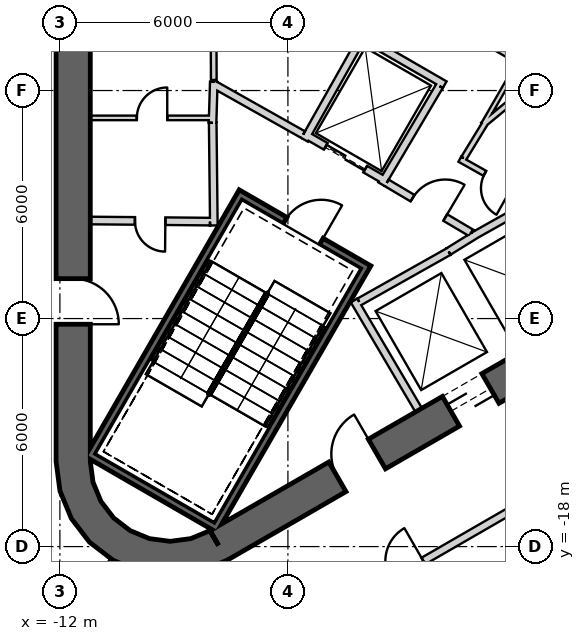
"""IFC4 building model, lengths in metres.
Left out: names, types, materials, properties, quantities, classifications, styles, units other than length and angle.
Written with IfcOpenShell. Run it as: python <this file> out.ifc"""

import sys

from ifc_helpers import new_model, si_unit, direction, frame, frame_2d, origin, place, context, subcontext, project, spatial, polyline, rectangle, outline, extrude, element, fill, save


model = new_model("IFC4")
c1 = context("Model", 3, precision=1e-05, world=origin(), true_north=direction((0.0, 1.0)))
c2 = subcontext(c1, "Body", "Model", "MODEL_VIEW")
j1 = project(units=[si_unit("LENGTHUNIT", "METRE"), si_unit("PLANEANGLEUNIT", "RADIAN")], contexts=[c1])
p1 = place(None, origin())
s1 = spatial("IfcSite", under=j1, at=p1, CompositionType="ELEMENT")
p2 = place(p1, origin())
s2 = spatial("IfcBuilding", under=s1, at=p2, CompositionType="ELEMENT")
p3 = place(p2, frame((0.0, 0.0, 398.3)))
s3 = spatial("IfcBuildingStorey", under=s2, at=p3, CompositionType="ELEMENT", Elevation=398.3)
p4 = place(p3, frame((-11.65, 15.762, 0.0), z_axis=(0.0, 0.0, 1.0), x_axis=(0.0, -1.0, 0.0)))
e1 = element("IfcWall", 1, at=p4, inside=s3, PredefinedType="SHEAR", context=c2, shape_type="SweptSolid", body=[
    extrude(rectangle(XDim=31.523, YDim=0.9, at=frame_2d((15.762, 0.0))), origin(), (0.0, 0.0, 1.0), 6.5),
])
p5 = place(p4, frame((3.612, 0.0, 0.0)))
e2 = element("IfcOpeningElement", 2, at=p5, cuts=e1, PredefinedType="OPENING", context=c2, shape_type="SweptSolid", body=[
    extrude(rectangle(XDim=1.2, YDim=2.4, at=frame_2d((0.6, 1.2))), frame((0.0, 0.46, 0.0), z_axis=(0.0, -1.0, 0.0), x_axis=(1.0, 0.0, 0.0)), (0.0, 0.0, 1.0), 0.92),
])
p6 = place(p4, frame((26.712, 0.0, 0.0)))
e3 = element("IfcOpeningElement", 3, at=p6, cuts=e1, PredefinedType="OPENING", context=c2, shape_type="SweptSolid", body=[
    extrude(rectangle(XDim=1.2, YDim=2.4, at=frame_2d((0.6, 1.2))), frame((0.0, 0.46, 0.0), z_axis=(0.0, -1.0, 0.0), x_axis=(1.0, 0.0, 0.0)), (0.0, 0.0, 1.0), 0.92),
])
p7 = place(p3, frame((-7.825, -17.97, 0.0), z_axis=(0.0, 0.0, 1.0), x_axis=(0.866028369851, 0.499994862586, 0.0)))
e4 = element("IfcWall", 4, at=p7, inside=s3, PredefinedType="SHEAR", context=c2, shape_type="SweptSolid", body=[
    extrude(rectangle(XDim=31.523, YDim=0.9, at=frame_2d((15.762, 0.0))), origin(), (0.0, 0.0, 1.0), 6.5),
])
p8 = place(p7, frame((7.062, 0.0, 0.0)))
e5 = element("IfcOpeningElement", 5, at=p8, cuts=e4, PredefinedType="OPENING", context=c2, shape_type="SweptSolid", body=[
    extrude(rectangle(XDim=1.2, YDim=2.4, at=frame_2d((0.6, 1.2))), frame((0.0, 0.46, 0.0), z_axis=(0.0, -1.0, 0.0), x_axis=(1.0, 0.0, 0.0)), (0.0, 0.0, 1.0), 0.92),
])
p9 = place(p7, frame((9.762, 0.0, 0.0)))
e6 = element("IfcOpeningElement", 6, at=p9, cuts=e4, PredefinedType="OPENING", context=c2, shape_type="SweptSolid", body=[
    extrude(rectangle(XDim=1.2, YDim=2.4, at=frame_2d((0.6, 1.2))), frame((0.0, 0.46, 0.0), z_axis=(0.0, -1.0, 0.0), x_axis=(1.0, 0.0, 0.0)), (0.0, 0.0, 1.0), 0.92),
])
p10 = place(p7, frame((17.862, 0.0, 0.0)))
e7 = element("IfcOpeningElement", 7, at=p10, cuts=e4, PredefinedType="OPENING", context=c2, shape_type="SweptSolid", body=[
    extrude(rectangle(XDim=1.2, YDim=2.4, at=frame_2d((0.6, 1.2))), frame((0.0, 0.46, 0.0), z_axis=(0.0, -1.0, 0.0), x_axis=(1.0, 0.0, 0.0)), (0.0, 0.0, 1.0), 0.92),
])
p11 = place(p7, frame((20.562, 0.0, 0.0)))
e8 = element("IfcOpeningElement", 8, at=p11, cuts=e4, PredefinedType="OPENING", context=c2, shape_type="SweptSolid", body=[
    extrude(rectangle(XDim=1.2, YDim=2.4, at=frame_2d((0.6, 1.2))), frame((0.0, 0.46, 0.0), z_axis=(0.0, -1.0, 0.0), x_axis=(1.0, 0.0, 0.0)), (0.0, 0.0, 1.0), 0.92),
])
p12 = place(p7, frame((26.712, 0.0, 0.0)))
e9 = element("IfcOpeningElement", 9, at=p12, cuts=e4, PredefinedType="OPENING", context=c2, shape_type="SweptSolid", body=[
    extrude(rectangle(XDim=1.2, YDim=2.4, at=frame_2d((0.6, 1.2))), frame((0.0, 0.46, 0.0), z_axis=(0.0, -1.0, 0.0), x_axis=(1.0, 0.0, 0.0)), (0.0, 0.0, 1.0), 0.92),
])
p13 = place(p7, frame((3.612, 0.0, 0.0)))
e10 = element("IfcOpeningElement", 10, at=p13, cuts=e4, PredefinedType="OPENING", context=c2, shape_type="SweptSolid", body=[
    extrude(rectangle(XDim=1.2, YDim=2.4, at=frame_2d((0.6, 1.2))), frame((0.0, 0.46, 0.0), z_axis=(0.0, -1.0, 0.0), x_axis=(1.0, 0.0, 0.0)), (0.0, 0.0, 1.0), 0.92),
])
p14 = place(p3, origin())
e11 = element("IfcWall", 11, at=p14, inside=s3, PredefinedType="SHEAR", context=c2, shape_type="SweptSolid", body=[
    extrude(outline(polyline([(-12.1, -15.762), (-11.998, -16.538), (-11.698, -17.262), (-11.221, -17.883), (-10.6, -18.36), (-9.876, -18.659), (-9.1, -18.762), (-8.323, -18.659), (-7.6, -18.36), (-8.05, -17.58), (-8.556, -17.79), (-9.1, -17.862), (-9.644, -17.79), (-10.15, -17.58), (-10.585, -17.247), (-10.919, -16.812), (-11.128, -16.305), (-11.2, -15.762), (-12.1, -15.762)])), origin(), (0.0, 0.0, 1.0), 6.5),
])
p15 = place(p3, frame((-2.558, -14.409, 0.0), z_axis=(0.0, 0.0, 1.0), x_axis=(-0.507997497166, 0.861358544901, 0.0)))
e12 = element("IfcWall", 12, at=p15, inside=s3, PredefinedType="PLUMBINGWALL", context=c2, shape_type="SweptSolid", body=[
    extrude(rectangle(XDim=3.35, YDim=0.2, at=frame_2d((1.675, 0.0))), origin(), (0.0, 0.0, 1.0), 6.2),
])
p16 = place(p3, frame((-1.769, -10.237, 0.0), z_axis=(0.0, 0.0, 1.0), x_axis=(-0.871534483978, -0.490334215854, 0.0)))
e13 = element("IfcWall", 13, at=p16, inside=s3, PredefinedType="PLUMBINGWALL", context=c2, shape_type="SweptSolid", body=[
    extrude(rectangle(XDim=2.7, YDim=0.2, at=frame_2d((1.35, 0.0))), origin(), (0.0, 0.0, 1.0), 6.2),
])
p17 = place(p3, frame((-1.024, -9.771, 0.0), z_axis=(0.0, 0.0, 1.0), x_axis=(-0.850348075135, -0.526220629693, 0.0)))
e14 = element("IfcWall", 14, at=p17, inside=s3, PredefinedType="PLUMBINGWALL", context=c2, shape_type="SweptSolid", body=[
    extrude(rectangle(XDim=0.878, YDim=0.2, at=frame_2d((0.439, 0.0))), origin(), (0.0, 0.0, 1.0), 6.2),
])
p18 = place(p3, frame((-1.13, -9.832, 0.0), z_axis=(0.0, 0.0, 1.0), x_axis=(0.871988740738, 0.489525929882, 0.0)))
e15 = element("IfcWall", 15, at=p18, inside=s3, PredefinedType="PLUMBINGWALL", context=c2, shape_type="SweptSolid", body=[
    extrude(rectangle(XDim=1.845, YDim=0.2, at=frame_2d((0.922, 0.0))), origin(), (0.0, 0.0, 1.0), 6.2),
])
p19 = place(p3, frame((-3.905, -10.563, -0.3), z_axis=(0.0, 0.0, 1.0), x_axis=(-0.500012932018, -0.866017937352, 0.0)))
e16 = element("IfcWall", 16, at=p19, inside=s3, PredefinedType="SHEAR", context=c2, shape_type="SweptSolid", body=[
    extrude(rectangle(XDim=8.1, YDim=0.2, at=frame_2d((4.05, 0.0))), origin(), (0.0, 0.0, 1.0), 6.5),
])
p20 = place(p3, frame((-11.282, -15.541, -0.3), z_axis=(0.0, 0.0, 1.0), x_axis=(0.866000483506, -0.500043160704, 0.0)))
e17 = element("IfcWall", 17, at=p20, inside=s3, PredefinedType="SHEAR", context=c2, shape_type="SweptSolid", body=[
    extrude(rectangle(XDim=3.8, YDim=0.2, at=frame_2d((1.9, 0.0))), origin(), (0.0, 0.0, 1.0), 6.5),
])
p21 = place(p3, frame((-7.196, -8.663, -0.3), z_axis=(0.0, 0.0, 1.0), x_axis=(-0.499997992926, -0.866026562566, 0.0)))
e18 = element("IfcWall", 18, at=p21, inside=s3, PredefinedType="SHEAR", context=c2, shape_type="SweptSolid", body=[
    extrude(rectangle(XDim=7.9, YDim=0.2, at=frame_2d((3.95, 0.0))), origin(), (0.0, 0.0, 1.0), 6.5),
])
p22 = place(p3, frame((-4.041, -10.599, -0.3), z_axis=(0.0, 0.0, 1.0), x_axis=(-0.866047807691, 0.499961193289, 0.0)))
e19 = element("IfcWall", 19, at=p22, inside=s3, PredefinedType="SHEAR", context=c2, shape_type="SweptSolid", body=[
    extrude(rectangle(XDim=3.6, YDim=0.2, at=frame_2d((1.8, 0.0))), origin(), (0.0, 0.0, 1.0), 6.5),
])
p23 = place(p22, frame((1.25, 0.0, 0.3)))
e20 = element("IfcOpeningElement", 20, at=p23, cuts=e19, PredefinedType="OPENING", context=c2, shape_type="SweptSolid", body=[
    extrude(rectangle(XDim=1.1, YDim=2.1, at=frame_2d((0.55, 1.05))), frame((0.0, 0.11, 0.0), z_axis=(0.0, -1.0, 0.0), x_axis=(1.0, 0.0, 0.0)), (0.0, 0.0, 1.0), 0.22),
])
p24 = place(p3, frame((-3.446, -8.368, 0.0), z_axis=(0.0, 0.0, 1.0), x_axis=(-0.866024647952, 0.500001309137, 0.0)))
e21 = element("IfcWall", 21, at=p24, inside=s3, PredefinedType="PLUMBINGWALL", context=c2, shape_type="SweptSolid", body=[
    extrude(rectangle(XDim=2.4, YDim=0.2, at=frame_2d((1.2, 0.0))), origin(), (0.0, 0.0, 1.0), 6.2),
])
p25 = place(p24, frame((0.6, 0.0, 0.0)))
e22 = element("IfcOpeningElement", 22, at=p25, cuts=e21, PredefinedType="OPENING", context=c2, shape_type="SweptSolid", body=[
    extrude(rectangle(XDim=1.2, YDim=2.4, at=frame_2d((0.6, 1.2))), frame((0.0, 0.11, 0.0), z_axis=(0.0, -1.0, 0.0), x_axis=(1.0, 0.0, 0.0)), (0.0, 0.0, 1.0), 0.22),
])
p26 = place(p3, frame((-5.562, -7.296, 0.0), z_axis=(0.0, 0.0, 1.0), x_axis=(0.491358283181, 0.870957540612, 0.0)))
e23 = element("IfcWall", 23, at=p26, inside=s3, PredefinedType="PLUMBINGWALL", context=c2, shape_type="SweptSolid", body=[
    extrude(rectangle(XDim=3.2, YDim=0.2, at=frame_2d((1.6, 0.0))), origin(), (0.0, 0.0, 1.0), 6.2),
])
p27 = place(p3, frame((-3.953, -4.646, 0.0), z_axis=(0.0, 0.0, 1.0), x_axis=(0.866024647952, -0.500001309137, 0.0)))
e24 = element("IfcWall", 24, at=p27, inside=s3, PredefinedType="PLUMBINGWALL", context=c2, shape_type="SweptSolid", body=[
    extrude(rectangle(XDim=2.4, YDim=0.2, at=frame_2d((1.2, 0.0))), origin(), (0.0, 0.0, 1.0), 6.2),
])
p28 = place(p3, frame((-2.012, -5.882, 0.0), z_axis=(0.0, 0.0, 1.0), x_axis=(-0.508619639323, -0.860991325447, 0.0)))
e25 = element("IfcWall", 25, at=p28, inside=s3, PredefinedType="PLUMBINGWALL", context=c2, shape_type="SweptSolid", body=[
    extrude(rectangle(XDim=3.0, YDim=0.2, at=frame_2d((1.5, 0.0))), origin(), (0.0, 0.0, 1.0), 6.2),
])
p29 = place(p3, frame((-11.2, -6.72, 0.0), z_axis=(0.0, 0.0, 1.0), x_axis=(1.0, 0.0, 0.0)))
e26 = element("IfcWall", 26, at=p29, inside=s3, PredefinedType="PARTITIONING", context=c2, shape_type="SweptSolid", body=[
    extrude(rectangle(XDim=3.25, YDim=0.12, at=frame_2d((1.625, 0.0))), origin(), (0.0, 0.0, 1.0), 6.2),
])
p30 = place(p29, frame((1.225, 0.0, 0.0)))
e27 = element("IfcOpeningElement", 27, at=p30, cuts=e26, PredefinedType="OPENING", context=c2, shape_type="SweptSolid", body=[
    extrude(rectangle(XDim=0.8, YDim=2.1, at=frame_2d((0.4, 1.05))), frame((0.0, 0.07, 0.0), z_axis=(0.0, -1.0, 0.0), x_axis=(1.0, 0.0, 0.0)), (0.0, 0.0, 1.0), 0.14),
])
p31 = place(p3, frame((-7.983, -6.85, 0.0), z_axis=(0.0, 0.0, 1.0), x_axis=(0.030803413295, 0.999525462272, 0.0)))
e28 = element("IfcWall", 28, at=p31, inside=s3, PredefinedType="PARTITIONING", context=c2, shape_type="SweptSolid", body=[
    extrude(rectangle(XDim=1.078, YDim=0.2, at=frame_2d((0.539, 0.0))), origin(), (0.0, 0.0, 1.0), 6.2),
])
p32 = place(p3, frame((-7.98, 1.35, 0.0), z_axis=(0.0, 0.0, 1.0), x_axis=(0.004177130679, -0.999991275752, 0.0)))
e29 = element("IfcWall", 29, at=p32, inside=s3, PredefinedType="PLUMBINGWALL", context=c2, shape_type="SweptSolid", body=[
    extrude(rectangle(XDim=7.072, YDim=0.15, at=frame_2d((3.536, 0.0))), origin(), (0.0, 0.0, 1.0), 6.2),
])
p33 = place(p3, frame((-7.949, -9.55, 0.0), z_axis=(0.0, 0.0, 1.0), x_axis=(-0.011121475088, 0.999938154483, 0.0)))
e30 = element("IfcWall", 30, at=p33, inside=s3, PredefinedType="PARTITIONING", context=c2, shape_type="SweptSolid", body=[
    extrude(rectangle(XDim=2.7, YDim=0.2, at=frame_2d((1.35, 0.0))), origin(), (0.0, 0.0, 1.0), 6.2),
])
p34 = place(p3, frame((-11.2, -9.42, 0.0), z_axis=(0.0, 0.0, 1.0), x_axis=(0.999957467379, -0.009222983926, 0.0)))
e31 = element("IfcWall", 31, at=p34, inside=s3, PredefinedType="PARTITIONING", context=c2, shape_type="SweptSolid", body=[
    extrude(rectangle(XDim=3.15, YDim=0.2, at=frame_2d((1.575, 0.0))), origin(), (0.0, 0.0, 1.0), 6.2),
])
p35 = place(p34, frame((1.175, 0.0, 0.0)))
e32 = element("IfcOpeningElement", 32, at=p35, cuts=e31, PredefinedType="OPENING", context=c2, shape_type="SweptSolid", body=[
    extrude(rectangle(XDim=0.8, YDim=2.1, at=frame_2d((0.4, 1.05))), frame((0.0, 0.11, 0.0), z_axis=(0.0, -1.0, 0.0), x_axis=(1.0, 0.0, 0.0)), (0.0, 0.0, 1.0), 0.22),
])
p36 = place(p3, frame((-7.976, -5.823, 0.0), z_axis=(0.0, 0.0, 1.0), x_axis=(0.871329070694, -0.490699144653, 0.0)))
e33 = element("IfcWall", 33, at=p36, inside=s3, PredefinedType="PARTITIONING", context=c2, shape_type="SweptSolid", body=[
    extrude(rectangle(XDim=2.726, YDim=0.2, at=frame_2d((1.363, 0.0))), origin(), (0.0, 0.0, 1.0), 6.2),
])
p37 = place(p3, frame((-3.401, -8.43, 0.0), z_axis=(0.0, 0.0, 1.0), x_axis=(0.860598681535, -0.509283721849, 0.0)))
e34 = element("IfcWall", 34, at=p37, inside=s3, PredefinedType="PARTITIONING", context=c2, shape_type="SweptSolid", body=[
    extrude(rectangle(XDim=2.581, YDim=0.2, at=frame_2d((1.291, 0.0))), origin(), (0.0, 0.0, 1.0), 6.2),
])
p38 = place(p37, frame((0.791, 0.0, 0.0)))
e35 = element("IfcOpeningElement", 35, at=p38, cuts=e34, PredefinedType="OPENING", context=c2, shape_type="SweptSolid", body=[
    extrude(rectangle(XDim=1.0, YDim=2.1, at=frame_2d((0.5, 1.05))), frame((0.0, 0.11, 0.0), z_axis=(0.0, -1.0, 0.0), x_axis=(1.0, 0.0, 0.0)), (0.0, 0.0, 1.0), 0.22),
])
p39 = place(p3, frame((6.046, -1.2, 0.0), z_axis=(0.0, 0.0, 1.0), x_axis=(-0.771489624803, -0.636241902755, 0.0)))
e36 = element("IfcWall", 36, at=p39, inside=s3, PredefinedType="PLUMBINGWALL", context=c2, shape_type="SweptSolid", body=[
    extrude(rectangle(XDim=8.961, YDim=0.15, at=frame_2d((4.48, 0.0))), origin(), (0.0, 0.0, 1.0), 6.2),
])
p40 = place(p3, frame((-1.477, -7.808, 0.0), z_axis=(0.0, 0.0, 1.0), x_axis=(0.871822901869, -0.48982122022, 0.0)))
e37 = element("IfcWall", 37, at=p40, inside=s3, PredefinedType="PLUMBINGWALL", context=c2, shape_type="SweptSolid", body=[
    extrude(rectangle(XDim=2.24, YDim=0.15, at=frame_2d((1.12, 0.0))), origin(), (0.0, 0.0, 1.0), 6.2),
])
p41 = place(p40, frame((0.757, 0.0, 0.0)))
e38 = element("IfcOpeningElement", 38, at=p41, cuts=e37, PredefinedType="OPENING", context=c2, shape_type="SweptSolid", body=[
    extrude(rectangle(XDim=0.8, YDim=2.1, at=frame_2d((0.4, 1.05))), frame((0.0, 0.085, 0.0), z_axis=(0.0, -1.0, 0.0), x_axis=(1.0, 0.0, 0.0)), (0.0, 0.0, 1.0), 0.17),
])
p42 = place(p3, frame((-0.787, -6.821, 0.0), z_axis=(0.0, 0.0, 1.0), x_axis=(-0.520993333897, -0.853560745369, 0.0)))
e39 = element("IfcWall", 39, at=p42, inside=s3, PredefinedType="PLUMBINGWALL", context=c2, shape_type="SweptSolid", body=[
    extrude(rectangle(XDim=1.125, YDim=0.15, at=frame_2d((0.562, 0.0))), origin(), (0.0, 0.0, 1.0), 6.2),
])
p43 = place(p3, frame((0.118, -5.195, 0.0), z_axis=(0.0, 0.0, 1.0), x_axis=(-0.499969367985, -0.866043088465, 0.0)))
e40 = element("IfcWall", 40, at=p43, inside=s3, PredefinedType="PARTITIONING", context=c2, shape_type="SweptSolid", body=[
    extrude(rectangle(XDim=1.94, YDim=0.12, at=frame_2d((0.97, 0.0))), origin(), (0.0, 0.0, 1.0), 6.2),
])
p44 = place(p3, frame((-1.566, -4.292, 0.0), z_axis=(0.0, 0.0, 1.0), x_axis=(0.866091100096, -0.499886193382, 0.0)))
e41 = element("IfcWall", 41, at=p44, inside=s3, PredefinedType="PARTITIONING", context=c2, shape_type="SweptSolid", body=[
    extrude(rectangle(XDim=1.85, YDim=0.12, at=frame_2d((0.925, 0.0))), origin(), (0.0, 0.0, 1.0), 6.2),
])
p45 = place(p3, frame((-10.549, -18.212, 0.0), z_axis=(0.0, 0.0, 1.0), x_axis=(-0.500047596559, -0.865997922154, 0.0)))
e42 = element("IfcWall", 42, at=p45, inside=s3, PredefinedType="PARTITIONING", context=c2, shape_type="SweptSolid", body=[
    extrude(rectangle(XDim=2.6, YDim=0.12, at=frame_2d((1.3, 0.0))), origin(), (0.0, 0.0, 1.0), 5.57),
])
p46 = place(p3, frame((-6.852, -20.93, 0.0), z_axis=(0.0, 0.0, 1.0), x_axis=(0.866016739626, 0.500015006463, 0.0)))
e43 = element("IfcWall", 43, at=p46, inside=s3, PredefinedType="PARTITIONING", context=c2, shape_type="SweptSolid", body=[
    extrude(rectangle(XDim=9.078, YDim=0.2, at=frame_2d((4.539, 0.0))), origin(), (0.0, 0.0, 1.0), 5.57),
])
p47 = place(p46, frame((4.1, 0.0, 0.0)))
e44 = element("IfcOpeningElement", 44, at=p47, cuts=e43, PredefinedType="OPENING", context=c2, shape_type="SweptSolid", body=[
    extrude(rectangle(XDim=1.0, YDim=2.1, at=frame_2d((0.5, 1.05))), frame((0.0, 0.11, 0.0), z_axis=(0.0, -1.0, 0.0), x_axis=(1.0, 0.0, 0.0)), (0.0, 0.0, 1.0), 0.22),
])
p48 = place(p23, origin())
e45 = element("IfcDoor", 45, at=p48, inside=s3, OperationType="SINGLE_SWING_LEFT", PredefinedType="USERDEFINED", context=c2, shape_type="SweptSolid", body=[
    extrude(rectangle(XDim=1.1, YDim=2.1, at=frame_2d((0.55, 1.05))), frame((0.0, 0.025, 0.0), z_axis=(0.0, -1.0, 0.0), x_axis=(1.0, 0.0, 0.0)), (0.0, 0.0, 1.0), 0.05),
])
fill(e20, e45)
p49 = place(p38, origin())
e46 = element("IfcDoor", 46, at=p49, inside=s3, OperationType="SINGLE_SWING_RIGHT", PredefinedType="USERDEFINED", context=c2, shape_type="SweptSolid", body=[
    extrude(rectangle(XDim=1.0, YDim=2.1, at=frame_2d((0.5, 1.05))), frame((0.0, 0.025, 0.0), z_axis=(0.0, -1.0, 0.0), x_axis=(1.0, 0.0, 0.0)), (0.0, 0.0, 1.0), 0.05),
])
fill(e35, e46)
p50 = place(p25, origin())
e47 = element("IfcDoor", 47, at=p50, inside=s3, OperationType="SLIDING_TO_LEFT", PredefinedType="USERDEFINED", context=c2, shape_type="SweptSolid", body=[
    extrude(rectangle(XDim=1.2, YDim=2.4, at=frame_2d((0.6, 1.2))), frame((0.0, 0.025, 0.0), z_axis=(0.0, -1.0, 0.0), x_axis=(1.0, 0.0, 0.0)), (0.0, 0.0, 1.0), 0.05),
])
fill(e22, e47)
p51 = place(p41, origin())
e48 = element("IfcDoor", 48, at=p51, inside=s3, OperationType="SINGLE_SWING_RIGHT", PredefinedType="USERDEFINED", context=c2, shape_type="SweptSolid", body=[
    extrude(rectangle(XDim=0.8, YDim=2.1, at=frame_2d((0.4, 1.05))), frame((0.0, 0.025, 0.0), z_axis=(0.0, -1.0, 0.0), x_axis=(1.0, 0.0, 0.0)), (0.0, 0.0, 1.0), 0.05),
])
fill(e38, e48)
p52 = place(p30, origin())
e49 = element("IfcDoor", 49, at=p52, inside=s3, OperationType="SINGLE_SWING_RIGHT", PredefinedType="USERDEFINED", context=c2, shape_type="SweptSolid", body=[
    extrude(rectangle(XDim=0.8, YDim=2.1, at=frame_2d((0.4, 1.05))), frame((0.0, 0.025, 0.0), z_axis=(0.0, -1.0, 0.0), x_axis=(1.0, 0.0, 0.0)), (0.0, 0.0, 1.0), 0.05),
])
fill(e27, e49)
p53 = place(p35, origin())
e50 = element("IfcDoor", 50, at=p53, inside=s3, OperationType="SINGLE_SWING_RIGHT", PredefinedType="USERDEFINED", context=c2, shape_type="SweptSolid", body=[
    extrude(rectangle(XDim=0.8, YDim=2.1, at=frame_2d((0.4, 1.05))), frame((0.0, 0.025, 0.0), z_axis=(0.0, -1.0, 0.0), x_axis=(1.0, 0.0, 0.0)), (0.0, 0.0, 1.0), 0.05),
])
fill(e32, e50)
p54 = place(p47, origin())
e51 = element("IfcDoor", 51, at=p54, inside=s3, OperationType="SINGLE_SWING_RIGHT", PredefinedType="USERDEFINED", context=c2, shape_type="SweptSolid", body=[
    extrude(rectangle(XDim=1.0, YDim=2.1, at=frame_2d((0.5, 1.05))), frame((0.0, 0.025, 0.0), z_axis=(0.0, -1.0, 0.0), x_axis=(1.0, 0.0, 0.0)), (0.0, 0.0, 1.0), 0.05),
])
fill(e44, e51)
p55 = place(p8, origin())
e52 = element("IfcDoor", 52, at=p55, inside=s3, OperationType="SLIDING_TO_LEFT", PredefinedType="USERDEFINED", context=c2, shape_type="SweptSolid", body=[
    extrude(rectangle(XDim=1.2, YDim=2.4, at=frame_2d((0.6, 1.2))), frame((0.0, 0.025, 0.0), z_axis=(0.0, -1.0, 0.0), x_axis=(1.0, 0.0, 0.0)), (0.0, 0.0, 1.0), 0.05),
])
fill(e5, e52)
p56 = place(p6, origin())
e53 = element("IfcDoor", 53, at=p56, inside=s3, OperationType="SINGLE_SWING_RIGHT", PredefinedType="USERDEFINED", context=c2, shape_type="SweptSolid", body=[
    extrude(rectangle(XDim=1.2, YDim=2.4, at=frame_2d((0.6, 1.2))), frame((0.0, 0.025, 0.0), z_axis=(0.0, -1.0, 0.0), x_axis=(1.0, 0.0, 0.0)), (0.0, 0.0, 1.0), 0.05),
])
fill(e3, e53)
p57 = place(p13, origin())
e54 = element("IfcDoor", 54, at=p57, inside=s3, OperationType="SINGLE_SWING_RIGHT", PredefinedType="USERDEFINED", context=c2, shape_type="SweptSolid", body=[
    extrude(rectangle(XDim=1.2, YDim=2.4, at=frame_2d((0.6, 1.2))), frame((0.0, 0.025, 0.0), z_axis=(0.0, -1.0, 0.0), x_axis=(1.0, 0.0, 0.0)), (0.0, 0.0, 1.0), 0.05),
])
fill(e10, e54)
save(model, sys.argv[1])
